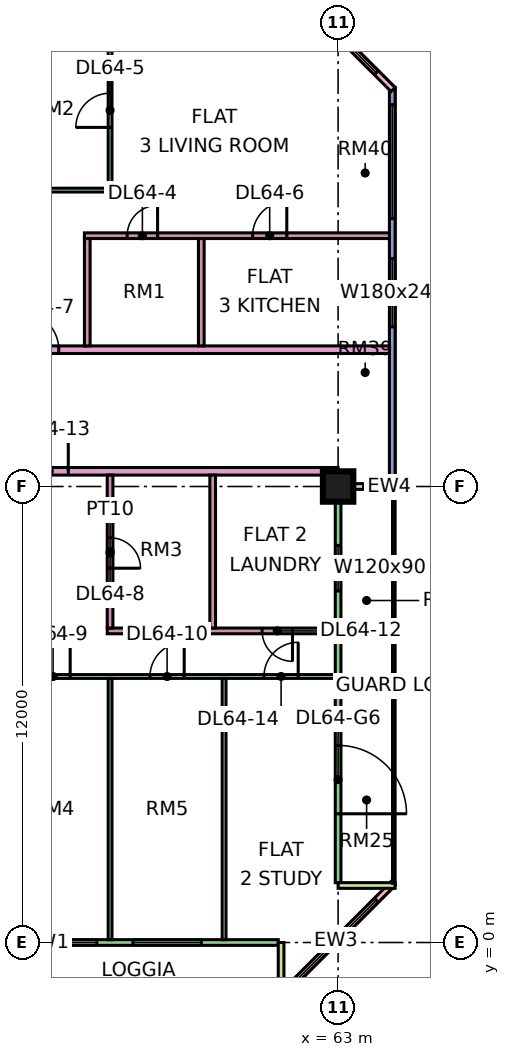
"""IFC4 building model, lengths in metres.
Left out: names, types, materials, properties, quantities, classifications, styles, units other than length and angle.
Written with IfcOpenShell. Run it as: python <this file> out.ifc"""

import sys

from ifc_helpers import new_model, si_unit, direction, frame, frame_2d, origin, origin_2d, place, context, subcontext, project, spatial, rectangle, extrude, element, fill, save


model = new_model("IFC4")
c1 = context("Model", 3, precision=1e-05, world=origin(), true_north=direction((0.0, 1.0)))
c2 = subcontext(c1, "Body", "Model", "MODEL_VIEW")
j1 = project(units=[si_unit("LENGTHUNIT", "METRE"), si_unit("PLANEANGLEUNIT", "RADIAN")], contexts=[c1])
p1 = place(None, origin())
s1 = spatial("IfcSite", under=j1, at=p1, CompositionType="ELEMENT")
p2 = place(p1, origin())
s2 = spatial("IfcBuilding", under=s1, at=p2, CompositionType="ELEMENT")
p3 = place(p2, frame((0.0, 0.0, 277.15)))
s3 = spatial("IfcBuildingStorey", under=s2, at=p3, CompositionType="ELEMENT", Elevation=277.15)
p4 = place(p3, frame((63.0, 12.0, 0.0), z_axis=(0.0, 0.0, 1.0), x_axis=(1.0, 0.0, 0.0)))
e1 = element("IfcColumn", 1, at=p4, inside=s3, PredefinedType="COLUMN", context=c2, shape_type="SweptSolid", body=[
    extrude(rectangle(XDim=0.8, YDim=0.8, at=origin_2d()), origin(), (0.0, 0.0, 1.0), 3.75),
])
p5 = place(p3, frame((48.075, 0.0, 0.0), z_axis=(0.0, 0.0, 1.0), x_axis=(1.0, 0.0, 0.0)))
e2 = element("IfcWall", 2, at=p5, inside=s3, PredefinedType="SOLIDWALL", context=c2, shape_type="SweptSolid", body=[
    extrude(rectangle(XDim=13.35, YDim=0.15, at=frame_2d((6.675, 0.0))), origin(), (0.0, 0.0, 1.0), 3.35),
])
p6 = place(p5, frame((1.812, 0.0, 0.0)))
e3 = element("IfcOpeningElement", 3, at=p6, cuts=e2, PredefinedType="OPENING", context=c2, shape_type="SweptSolid", body=[
    extrude(rectangle(XDim=1.8, YDim=2.4, at=frame_2d((0.9, 1.2))), frame((0.0, 0.085, 0.0), z_axis=(0.0, -1.0, 0.0), x_axis=(1.0, 0.0, 0.0)), (0.0, 0.0, 1.0), 0.17),
])
p7 = place(p5, frame((6.775, 0.0, 0.45)))
e4 = element("IfcOpeningElement", 4, at=p7, cuts=e2, PredefinedType="OPENING", context=c2, shape_type="SweptSolid", body=[
    extrude(rectangle(XDim=1.8, YDim=2.4, at=frame_2d((0.9, 1.2))), frame((0.0, 0.085, 0.0), z_axis=(0.0, -1.0, 0.0), x_axis=(1.0, 0.0, 0.0)), (0.0, 0.0, 1.0), 0.17),
])
p8 = place(p5, frame((9.525, 0.0, 0.45)))
e5 = element("IfcOpeningElement", 5, at=p8, cuts=e2, PredefinedType="OPENING", context=c2, shape_type="SweptSolid", body=[
    extrude(rectangle(XDim=1.8, YDim=2.4, at=frame_2d((0.9, 1.2))), frame((0.0, 0.085, 0.0), z_axis=(0.0, -1.0, 0.0), x_axis=(1.0, 0.0, 0.0)), (0.0, 0.0, 1.0), 0.17),
])
p9 = place(p3, frame((61.5, -1.5, 0.0), z_axis=(0.0, 0.0, 1.0), x_axis=(0.0, 1.0, 0.0)))
e6 = element("IfcWall", 6, at=p9, inside=s3, PredefinedType="SOLIDWALL", context=c2, shape_type="SweptSolid", body=[
    extrude(rectangle(XDim=1.5, YDim=0.15, at=frame_2d((0.75, 0.0))), origin(), (0.0, 0.0, 1.0), 3.35),
])
p10 = place(p3, frame((61.447, -1.447, 0.0), z_axis=(0.0, 0.0, 1.0), x_axis=(0.707106781187, 0.707106781187, 0.0)))
e7 = element("IfcWall", 7, at=p10, inside=s3, PredefinedType="SOLIDWALL", context=c2, shape_type="SweptSolid", body=[
    extrude(rectangle(XDim=4.243, YDim=0.15, at=frame_2d((2.121, 0.0))), origin(), (0.0, 0.0, 1.0), 3.35),
])
p11 = place(p10, frame((0.621, 0.0, 0.45)))
e8 = element("IfcOpeningElement", 8, at=p11, cuts=e7, PredefinedType="OPENING", context=c2, shape_type="SweptSolid", body=[
    extrude(rectangle(XDim=3.0, YDim=2.4, at=frame_2d((1.5, 1.2))), frame((0.0, 0.085, 0.0), z_axis=(0.0, -1.0, 0.0), x_axis=(1.0, 0.0, 0.0)), (0.0, 0.0, 1.0), 0.17),
])
p12 = place(p3, frame((63.0, 1.575, 0.0), z_axis=(0.0, 0.0, 1.0), x_axis=(0.0, 1.0, 0.0)))
e9 = element("IfcWall", 9, at=p12, inside=s3, PredefinedType="SOLIDWALL", context=c2, shape_type="SweptSolid", body=[
    extrude(rectangle(XDim=10.35, YDim=0.15, at=frame_2d((5.175, 0.0))), origin(), (0.0, 0.0, 1.0), 3.35),
])
p13 = place(p12, frame((1.812, 0.0, 0.0)))
e10 = element("IfcOpeningElement", 10, at=p13, cuts=e9, PredefinedType="OPENING", context=c2, shape_type="SweptSolid", body=[
    extrude(rectangle(XDim=1.8, YDim=2.4, at=frame_2d((0.9, 1.2))), frame((0.0, 0.085, 0.0), z_axis=(0.0, -1.0, 0.0), x_axis=(1.0, 0.0, 0.0)), (0.0, 0.0, 1.0), 0.17),
])
p14 = place(p12, frame((7.675, 0.0, 1.7)))
e11 = element("IfcOpeningElement", 11, at=p14, cuts=e9, PredefinedType="OPENING", context=c2, shape_type="SweptSolid", body=[
    extrude(rectangle(XDim=1.2, YDim=0.9, at=frame_2d((0.6, 0.45))), frame((0.0, 0.085, 0.0), z_axis=(0.0, -1.0, 0.0), x_axis=(1.0, 0.0, 0.0)), (0.0, 0.0, 1.0), 0.17),
])
for number, where, z_axis, x_axis in (
    (12, (64.5, 1.5, 0.0), (0.0, 0.0, 1.0), (-1.0, 0.0, 0.0)),
    (13, (64.5, 12.0, 0.0), (0.0, 0.0, 1.0), (-1.0, 0.0, 0.0)),
):
    element("IfcWall", number, at=place(p3, frame(where, z_axis=z_axis, x_axis=x_axis)), inside=s3, PredefinedType="SOLIDWALL", context=c2, shape_type="SweptSolid", body=[
        extrude(rectangle(XDim=1.5, YDim=0.15, at=frame_2d((0.75, 0.0))), origin(), (0.0, 0.0, 1.0), 3.35),
    ])
p15 = place(p3, frame((64.425, 12.075, 0.0), z_axis=(0.0, 0.0, 1.0), x_axis=(0.0, 1.0, 0.0)))
e14 = element("IfcWall", 14, at=p15, inside=s3, PredefinedType="SOLIDWALL", context=c2, shape_type="SweptSolid", body=[
    extrude(rectangle(XDim=10.425, YDim=0.15, at=frame_2d((5.212, 0.0))), origin(), (0.0, 0.0, 1.0), 3.35),
])
p16 = place(p15, frame((4.125, 0.0, 0.45)))
e15 = element("IfcOpeningElement", 15, at=p16, cuts=e14, PredefinedType="OPENING", context=c2, shape_type="SweptSolid", body=[
    extrude(rectangle(XDim=1.8, YDim=2.4, at=frame_2d((0.9, 1.2))), frame((0.0, 0.085, 0.0), z_axis=(0.0, -1.0, 0.0), x_axis=(1.0, 0.0, 0.0)), (0.0, 0.0, 1.0), 0.17),
])
p17 = place(p15, frame((6.975, 0.0, 0.45)))
e16 = element("IfcOpeningElement", 16, at=p17, cuts=e14, PredefinedType="OPENING", context=c2, shape_type="SweptSolid", body=[
    extrude(rectangle(XDim=3.0, YDim=2.4, at=frame_2d((1.5, 1.2))), frame((0.0, 0.085, 0.0), z_axis=(0.0, -1.0, 0.0), x_axis=(1.0, 0.0, 0.0)), (0.0, 0.0, 1.0), 0.17),
])
p18 = place(p3, frame((64.447, 22.447, 0.0), z_axis=(0.0, 0.0, 1.0), x_axis=(-0.707106781187, 0.707106781187, 0.0)))
e17 = element("IfcWall", 17, at=p18, inside=s3, PredefinedType="SOLIDWALL", context=c2, shape_type="SweptSolid", body=[
    extrude(rectangle(XDim=4.243, YDim=0.15, at=frame_2d((2.121, 0.0))), origin(), (0.0, 0.0, 1.0), 3.35),
])
p19 = place(p18, frame((0.621, 0.0, 0.45)))
e18 = element("IfcOpeningElement", 18, at=p19, cuts=e17, PredefinedType="OPENING", context=c2, shape_type="SweptSolid", body=[
    extrude(rectangle(XDim=3.0, YDim=2.4, at=frame_2d((1.5, 1.2))), frame((0.0, 0.085, 0.0), z_axis=(0.0, -1.0, 0.0), x_axis=(1.0, 0.0, 0.0)), (0.0, 0.0, 1.0), 0.17),
])
p20 = place(p3, frame((40.65, 12.4, 0.0), z_axis=(0.0, 0.0, 1.0), x_axis=(1.0, 0.0, 0.0)))
e19 = element("IfcWall", 19, at=p20, inside=s3, PredefinedType="PARTITIONING", context=c2, shape_type="SweptSolid", body=[
    extrude(rectangle(XDim=22.35, YDim=0.2, at=frame_2d((11.175, 0.0))), origin(), (0.0, 0.0, 1.0), 3.35),
])
p21 = place(p20, frame((14.25, 0.0, 0.0)))
e20 = element("IfcOpeningElement", 20, at=p21, cuts=e19, PredefinedType="OPENING", context=c2, shape_type="SweptSolid", body=[
    extrude(rectangle(XDim=1.0, YDim=2.1, at=frame_2d((0.5, 1.05))), frame((0.0, 0.11, 0.0), z_axis=(0.0, -1.0, 0.0), x_axis=(1.0, 0.0, 0.0)), (0.0, 0.0, 1.0), 0.22),
])
p22 = place(p20, frame((1.05, 0.0, 0.0)))
e21 = element("IfcOpeningElement", 21, at=p22, cuts=e19, PredefinedType="OPENING", context=c2, shape_type="SweptSolid", body=[
    extrude(rectangle(XDim=1.0, YDim=2.1, at=frame_2d((0.5, 1.05))), frame((0.0, 0.11, 0.0), z_axis=(0.0, -1.0, 0.0), x_axis=(1.0, 0.0, 0.0)), (0.0, 0.0, 1.0), 0.22),
])
p23 = place(p3, frame((51.225, 15.6, 0.0), z_axis=(0.0, 0.0, 1.0), x_axis=(1.0, 0.0, 0.0)))
e22 = element("IfcWall", 22, at=p23, inside=s3, PredefinedType="PARTITIONING", context=c2, shape_type="SweptSolid", body=[
    extrude(rectangle(XDim=13.125, YDim=0.2, at=frame_2d((6.562, 0.0))), origin(), (0.0, 0.0, 1.0), 3.35),
])
p24 = place(p23, frame((3.425, 0.0, 0.0)))
e23 = element("IfcOpeningElement", 23, at=p24, cuts=e22, PredefinedType="OPENING", context=c2, shape_type="SweptSolid", body=[
    extrude(rectangle(XDim=1.0, YDim=2.1, at=frame_2d((0.5, 1.05))), frame((0.0, 0.11, 0.0), z_axis=(0.0, -1.0, 0.0), x_axis=(1.0, 0.0, 0.0)), (0.0, 0.0, 1.0), 0.22),
])
p25 = place(p23, frame((0.875, 0.0, 0.0)))
e24 = element("IfcOpeningElement", 24, at=p25, cuts=e22, PredefinedType="OPENING", context=c2, shape_type="SweptSolid", body=[
    extrude(rectangle(XDim=1.0, YDim=2.1, at=frame_2d((0.5, 1.05))), frame((0.0, 0.11, 0.0), z_axis=(0.0, -1.0, 0.0), x_axis=(1.0, 0.0, 0.0)), (0.0, 0.0, 1.0), 0.22),
])
p26 = place(p3, frame((53.95, 7.0, 0.0), z_axis=(0.0, 0.0, 1.0), x_axis=(1.0, 0.0, 0.0)))
e25 = element("IfcWall", 25, at=p26, inside=s3, PredefinedType="PARTITIONING", context=c2, shape_type="SweptSolid", body=[
    extrude(rectangle(XDim=8.976, YDim=0.1, at=frame_2d((4.488, 0.0))), origin(), (0.0, 0.0, 1.0), 3.35),
])
p27 = place(p26, frame((1.1, 0.0, 0.0)))
e26 = element("IfcOpeningElement", 26, at=p27, cuts=e25, PredefinedType="OPENING", context=c2, shape_type="SweptSolid", body=[
    extrude(rectangle(XDim=0.9, YDim=2.1, at=frame_2d((0.45, 1.05))), frame((0.0, 0.06, 0.0), z_axis=(0.0, -1.0, 0.0), x_axis=(1.0, 0.0, 0.0)), (0.0, 0.0, 1.0), 0.12),
])
p28 = place(p26, frame((4.1, 0.0, 0.0)))
e27 = element("IfcOpeningElement", 27, at=p28, cuts=e25, PredefinedType="OPENING", context=c2, shape_type="SweptSolid", body=[
    extrude(rectangle(XDim=0.9, YDim=2.1, at=frame_2d((0.45, 1.05))), frame((0.0, 0.06, 0.0), z_axis=(0.0, -1.0, 0.0), x_axis=(1.0, 0.0, 0.0)), (0.0, 0.0, 1.0), 0.12),
])
p29 = place(p26, frame((7.1, 0.0, 0.0)))
e28 = element("IfcOpeningElement", 28, at=p29, cuts=e25, PredefinedType="OPENING", context=c2, shape_type="SweptSolid", body=[
    extrude(rectangle(XDim=0.9, YDim=2.1, at=frame_2d((0.45, 1.05))), frame((0.0, 0.06, 0.0), z_axis=(0.0, -1.0, 0.0), x_axis=(1.0, 0.0, 0.0)), (0.0, 0.0, 1.0), 0.12),
])
p30 = place(p3, frame((54.1, 19.8, 0.0), z_axis=(0.0, 0.0, 1.0), x_axis=(1.0, 0.0, 0.0)))
e29 = element("IfcWall", 29, at=p30, inside=s3, PredefinedType="PARTITIONING", context=c2, shape_type="SweptSolid", body=[
    extrude(rectangle(XDim=2.85, YDim=0.1, at=frame_2d((1.425, 0.0))), origin(), (0.0, 0.0, 1.0), 3.35),
])
p31 = place(p3, frame((56.325, 18.6, 0.0), z_axis=(0.0, 0.0, 1.0), x_axis=(1.0, 0.0, 0.0)))
e30 = element("IfcWall", 30, at=p31, inside=s3, PredefinedType="PARTITIONING", context=c2, shape_type="SweptSolid", body=[
    extrude(rectangle(XDim=8.025, YDim=0.15, at=frame_2d((4.013, 0.0))), origin(), (0.0, 0.0, 1.0), 3.35),
])
p32 = place(p31, frame((1.125, 0.0, 0.0)))
e31 = element("IfcOpeningElement", 31, at=p32, cuts=e30, PredefinedType="OPENING", context=c2, shape_type="SweptSolid", body=[
    extrude(rectangle(XDim=0.8, YDim=2.1, at=frame_2d((0.4, 1.05))), frame((0.0, 0.085, 0.0), z_axis=(0.0, -1.0, 0.0), x_axis=(1.0, 0.0, 0.0)), (0.0, 0.0, 1.0), 0.17),
])
p33 = place(p31, frame((4.425, 0.0, 0.0)))
e32 = element("IfcOpeningElement", 32, at=p33, cuts=e30, PredefinedType="OPENING", context=c2, shape_type="SweptSolid", body=[
    extrude(rectangle(XDim=0.9, YDim=2.1, at=frame_2d((0.45, 1.05))), frame((0.0, 0.085, 0.0), z_axis=(0.0, -1.0, 0.0), x_axis=(1.0, 0.0, 0.0)), (0.0, 0.0, 1.0), 0.17),
])
p34 = place(p3, frame((56.4, 15.7, 0.0), z_axis=(0.0, 0.0, 1.0), x_axis=(0.0, 1.0, 0.0)))
e33 = element("IfcWall", 33, at=p34, inside=s3, PredefinedType="PARTITIONING", context=c2, shape_type="SweptSolid", body=[
    extrude(rectangle(XDim=2.825, YDim=0.15, at=frame_2d((1.413, 0.0))), origin(), (0.0, 0.0, 1.0), 3.35),
])
p35 = place(p3, frame((56.925, 8.2, 0.0), z_axis=(0.0, 0.0, 1.0), x_axis=(1.0, 0.0, 0.0)))
e34 = element("IfcWall", 34, at=p35, inside=s3, PredefinedType="PARTITIONING", context=c2, shape_type="SweptSolid", body=[
    extrude(rectangle(XDim=6.001, YDim=0.15, at=frame_2d((3.0, 0.0))), origin(), (0.0, 0.0, 1.0), 3.35),
])
p36 = place(p35, frame((4.075, 0.0, 0.0)))
e35 = element("IfcOpeningElement", 35, at=p36, cuts=e34, PredefinedType="OPENING", context=c2, shape_type="SweptSolid", body=[
    extrude(rectangle(XDim=0.8, YDim=2.1, at=frame_2d((0.4, 1.05))), frame((0.0, 0.085, 0.0), z_axis=(0.0, -1.0, 0.0), x_axis=(1.0, 0.0, 0.0)), (0.0, 0.0, 1.0), 0.17),
])
p37 = place(p3, frame((57.0, 0.074, 0.0), z_axis=(0.0, 0.0, 1.0), x_axis=(0.0, 1.0, 0.0)))
e36 = element("IfcWall", 36, at=p37, inside=s3, PredefinedType="PARTITIONING", context=c2, shape_type="SweptSolid", body=[
    extrude(rectangle(XDim=6.876, YDim=0.1, at=frame_2d((3.438, 0.0))), origin(), (0.0, 0.0, 1.0), 3.35),
])
p38 = place(p3, frame((57.0, 8.275, 0.0), z_axis=(0.0, 0.0, 1.0), x_axis=(0.0, 1.0, 0.0)))
e37 = element("IfcWall", 37, at=p38, inside=s3, PredefinedType="PARTITIONING", context=c2, shape_type="SweptSolid", body=[
    extrude(rectangle(XDim=4.025, YDim=0.15, at=frame_2d((2.013, 0.0))), origin(), (0.0, 0.0, 1.0), 3.35),
])
p39 = place(p38, frame((1.575, 0.0, 0.0)))
e38 = element("IfcOpeningElement", 38, at=p39, cuts=e37, PredefinedType="OPENING", context=c2, shape_type="SweptSolid", body=[
    extrude(rectangle(XDim=0.8, YDim=2.1, at=frame_2d((0.4, 1.05))), frame((0.0, 0.085, 0.0), z_axis=(0.0, -1.0, 0.0), x_axis=(1.0, 0.0, 0.0)), (0.0, 0.0, 1.0), 0.17),
])
p40 = place(p3, frame((57.0, 19.75, 0.0), z_axis=(0.0, 0.0, 1.0), x_axis=(0.0, 1.0, 0.0)))
e39 = element("IfcWall", 39, at=p40, inside=s3, PredefinedType="PARTITIONING", context=c2, shape_type="SweptSolid", body=[
    extrude(rectangle(XDim=4.176, YDim=0.1, at=frame_2d((2.088, 0.0))), origin(), (0.0, 0.0, 1.0), 3.35),
])
p41 = place(p40, frame((1.7, 0.0, 0.0)))
e40 = element("IfcOpeningElement", 40, at=p41, cuts=e39, PredefinedType="OPENING", context=c2, shape_type="SweptSolid", body=[
    extrude(rectangle(XDim=0.9, YDim=2.1, at=frame_2d((0.45, 1.05))), frame((0.0, 0.06, 0.0), z_axis=(0.0, -1.0, 0.0), x_axis=(1.0, 0.0, 0.0)), (0.0, 0.0, 1.0), 0.12),
])
p42 = place(p3, frame((59.4, 15.7, 0.0), z_axis=(0.0, 0.0, 1.0), x_axis=(0.0, 1.0, 0.0)))
e41 = element("IfcWall", 41, at=p42, inside=s3, PredefinedType="PARTITIONING", context=c2, shape_type="SweptSolid", body=[
    extrude(rectangle(XDim=2.825, YDim=0.15, at=frame_2d((1.413, 0.0))), origin(), (0.0, 0.0, 1.0), 3.35),
])
p43 = place(p3, frame((59.7, 8.275, 0.0), z_axis=(0.0, 0.0, 1.0), x_axis=(0.0, 1.0, 0.0)))
e42 = element("IfcWall", 42, at=p43, inside=s3, PredefinedType="PARTITIONING", context=c2, shape_type="SweptSolid", body=[
    extrude(rectangle(XDim=4.025, YDim=0.15, at=frame_2d((2.013, 0.0))), origin(), (0.0, 0.0, 1.0), 3.35),
])
p44 = place(p3, frame((60.0, 0.074, 0.0), z_axis=(0.0, 0.0, 1.0), x_axis=(0.0, 1.0, 0.0)))
e43 = element("IfcWall", 43, at=p44, inside=s3, PredefinedType="PARTITIONING", context=c2, shape_type="SweptSolid", body=[
    extrude(rectangle(XDim=6.876, YDim=0.1, at=frame_2d((3.438, 0.0))), origin(), (0.0, 0.0, 1.0), 3.35),
])
p45 = place(p7, origin())
e44 = element("IfcWindow", 44, at=p45, inside=s3, PartitioningType="SINGLE_PANEL", PredefinedType="WINDOW", context=c2, shape_type="SweptSolid", body=[
    extrude(rectangle(XDim=1.8, YDim=2.4, at=frame_2d((0.9, 1.2))), frame((0.0, 0.03, 0.0), z_axis=(0.0, -1.0, 0.0), x_axis=(1.0, 0.0, 0.0)), (0.0, 0.0, 1.0), 0.06),
])
fill(e4, e44)
p46 = place(p8, origin())
e45 = element("IfcWindow", 45, at=p46, inside=s3, PartitioningType="SINGLE_PANEL", PredefinedType="WINDOW", context=c2, shape_type="SweptSolid", body=[
    extrude(rectangle(XDim=1.8, YDim=2.4, at=frame_2d((0.9, 1.2))), frame((0.0, 0.03, 0.0), z_axis=(0.0, -1.0, 0.0), x_axis=(1.0, 0.0, 0.0)), (0.0, 0.0, 1.0), 0.06),
])
fill(e5, e45)
p47 = place(p11, origin())
e46 = element("IfcWindow", 46, at=p47, inside=s3, PartitioningType="SINGLE_PANEL", PredefinedType="WINDOW", context=c2, shape_type="SweptSolid", body=[
    extrude(rectangle(XDim=3.0, YDim=2.4, at=frame_2d((1.5, 1.2))), frame((0.0, 0.03, 0.0), z_axis=(0.0, -1.0, 0.0), x_axis=(1.0, 0.0, 0.0)), (0.0, 0.0, 1.0), 0.06),
])
fill(e8, e46)
p48 = place(p13, frame((1.8, 0.0, 0.0), z_axis=(0.0, 0.0, 1.0), x_axis=(-1.0, 0.0, 0.0)))
e47 = element("IfcDoor", 47, at=p48, inside=s3, OperationType="DOUBLE_DOOR_SINGLE_SWING", PredefinedType="DOOR", context=c2, shape_type="SweptSolid", body=[
    extrude(rectangle(XDim=1.8, YDim=2.4, at=frame_2d((0.9, 1.2))), frame((0.0, 0.025, 0.0), z_axis=(0.0, -1.0, 0.0), x_axis=(1.0, 0.0, 0.0)), (0.0, 0.0, 1.0), 0.05),
])
fill(e10, e47)
p49 = place(p14, origin())
e48 = element("IfcWindow", 48, at=p49, inside=s3, PartitioningType="SINGLE_PANEL", PredefinedType="WINDOW", context=c2, shape_type="SweptSolid", body=[
    extrude(rectangle(XDim=1.2, YDim=0.9, at=frame_2d((0.6, 0.45))), frame((0.0, 0.03, 0.0), z_axis=(0.0, -1.0, 0.0), x_axis=(1.0, 0.0, 0.0)), (0.0, 0.0, 1.0), 0.06),
])
fill(e11, e48)
p50 = place(p16, origin())
e49 = element("IfcWindow", 49, at=p50, inside=s3, PartitioningType="SINGLE_PANEL", PredefinedType="WINDOW", context=c2, shape_type="SweptSolid", body=[
    extrude(rectangle(XDim=1.8, YDim=2.4, at=frame_2d((0.9, 1.2))), frame((0.0, 0.03, 0.0), z_axis=(0.0, -1.0, 0.0), x_axis=(1.0, 0.0, 0.0)), (0.0, 0.0, 1.0), 0.06),
])
fill(e15, e49)
p51 = place(p17, origin())
e50 = element("IfcWindow", 50, at=p51, inside=s3, PartitioningType="SINGLE_PANEL", PredefinedType="WINDOW", context=c2, shape_type="SweptSolid", body=[
    extrude(rectangle(XDim=3.0, YDim=2.4, at=frame_2d((1.5, 1.2))), frame((0.0, 0.03, 0.0), z_axis=(0.0, -1.0, 0.0), x_axis=(1.0, 0.0, 0.0)), (0.0, 0.0, 1.0), 0.06),
])
fill(e16, e50)
p52 = place(p19, origin())
e51 = element("IfcWindow", 51, at=p52, inside=s3, PartitioningType="SINGLE_PANEL", PredefinedType="WINDOW", context=c2, shape_type="SweptSolid", body=[
    extrude(rectangle(XDim=3.0, YDim=2.4, at=frame_2d((1.5, 1.2))), frame((0.0, 0.03, 0.0), z_axis=(0.0, -1.0, 0.0), x_axis=(1.0, 0.0, 0.0)), (0.0, 0.0, 1.0), 0.06),
])
fill(e18, e51)
p53 = place(p32, frame((0.8, 0.0, 0.0), z_axis=(0.0, 0.0, 1.0), x_axis=(-1.0, 0.0, 0.0)))
e52 = element("IfcDoor", 52, at=p53, inside=s3, OperationType="SINGLE_SWING_RIGHT", PredefinedType="DOOR", context=c2, shape_type="SweptSolid", body=[
    extrude(rectangle(XDim=0.8, YDim=2.1, at=frame_2d((0.4, 1.05))), frame((0.0, 0.025, 0.0), z_axis=(0.0, -1.0, 0.0), x_axis=(1.0, 0.0, 0.0)), (0.0, 0.0, 1.0), 0.05),
])
fill(e31, e52)
p54 = place(p41, origin())
e53 = element("IfcDoor", 53, at=p54, inside=s3, OperationType="SINGLE_SWING_LEFT", PredefinedType="DOOR", context=c2, shape_type="SweptSolid", body=[
    extrude(rectangle(XDim=0.9, YDim=2.1, at=frame_2d((0.45, 1.05))), frame((0.0, 0.025, 0.0), z_axis=(0.0, -1.0, 0.0), x_axis=(1.0, 0.0, 0.0)), (0.0, 0.0, 1.0), 0.05),
])
fill(e40, e53)
p55 = place(p33, frame((0.9, 0.0, 0.0), z_axis=(0.0, 0.0, 1.0), x_axis=(-1.0, 0.0, 0.0)))
e54 = element("IfcDoor", 54, at=p55, inside=s3, OperationType="SINGLE_SWING_RIGHT", PredefinedType="DOOR", context=c2, shape_type="SweptSolid", body=[
    extrude(rectangle(XDim=0.9, YDim=2.1, at=frame_2d((0.45, 1.05))), frame((0.0, 0.025, 0.0), z_axis=(0.0, -1.0, 0.0), x_axis=(1.0, 0.0, 0.0)), (0.0, 0.0, 1.0), 0.05),
])
fill(e32, e54)
p56 = place(p24, origin())
e55 = element("IfcDoor", 55, at=p56, inside=s3, OperationType="SINGLE_SWING_LEFT", PredefinedType="DOOR", context=c2, shape_type="SweptSolid", body=[
    extrude(rectangle(XDim=1.0, YDim=2.1, at=frame_2d((0.5, 1.05))), frame((0.0, 0.025, 0.0), z_axis=(0.0, -1.0, 0.0), x_axis=(1.0, 0.0, 0.0)), (0.0, 0.0, 1.0), 0.05),
])
fill(e23, e55)
p57 = place(p39, frame((0.8, 0.0, 0.0), z_axis=(0.0, 0.0, 1.0), x_axis=(-1.0, 0.0, 0.0)))
e56 = element("IfcDoor", 56, at=p57, inside=s3, OperationType="SINGLE_SWING_LEFT", PredefinedType="DOOR", context=c2, shape_type="SweptSolid", body=[
    extrude(rectangle(XDim=0.8, YDim=2.1, at=frame_2d((0.4, 1.05))), frame((0.0, 0.025, 0.0), z_axis=(0.0, -1.0, 0.0), x_axis=(1.0, 0.0, 0.0)), (0.0, 0.0, 1.0), 0.05),
])
fill(e38, e56)
p58 = place(p27, frame((0.9, 0.0, 0.0), z_axis=(0.0, 0.0, 1.0), x_axis=(-1.0, 0.0, 0.0)))
e57 = element("IfcDoor", 57, at=p58, inside=s3, OperationType="SINGLE_SWING_RIGHT", PredefinedType="DOOR", context=c2, shape_type="SweptSolid", body=[
    extrude(rectangle(XDim=0.9, YDim=2.1, at=frame_2d((0.45, 1.05))), frame((0.0, 0.025, 0.0), z_axis=(0.0, -1.0, 0.0), x_axis=(1.0, 0.0, 0.0)), (0.0, 0.0, 1.0), 0.05),
])
fill(e26, e57)
p59 = place(p28, frame((0.9, 0.0, 0.0), z_axis=(0.0, 0.0, 1.0), x_axis=(-1.0, 0.0, 0.0)))
e58 = element("IfcDoor", 58, at=p59, inside=s3, OperationType="SINGLE_SWING_RIGHT", PredefinedType="DOOR", context=c2, shape_type="SweptSolid", body=[
    extrude(rectangle(XDim=0.9, YDim=2.1, at=frame_2d((0.45, 1.05))), frame((0.0, 0.025, 0.0), z_axis=(0.0, -1.0, 0.0), x_axis=(1.0, 0.0, 0.0)), (0.0, 0.0, 1.0), 0.05),
])
fill(e27, e58)
p60 = place(p36, origin())
e59 = element("IfcDoor", 59, at=p60, inside=s3, OperationType="SINGLE_SWING_RIGHT", PredefinedType="DOOR", context=c2, shape_type="SweptSolid", body=[
    extrude(rectangle(XDim=0.8, YDim=2.1, at=frame_2d((0.4, 1.05))), frame((0.0, 0.025, 0.0), z_axis=(0.0, -1.0, 0.0), x_axis=(1.0, 0.0, 0.0)), (0.0, 0.0, 1.0), 0.05),
])
fill(e35, e59)
p61 = place(p21, frame((1.0, 0.0, 0.0), z_axis=(0.0, 0.0, 1.0), x_axis=(-1.0, 0.0, 0.0)))
e60 = element("IfcDoor", 60, at=p61, inside=s3, OperationType="SINGLE_SWING_RIGHT", PredefinedType="DOOR", context=c2, shape_type="SweptSolid", body=[
    extrude(rectangle(XDim=1.0, YDim=2.1, at=frame_2d((0.5, 1.05))), frame((0.0, 0.025, 0.0), z_axis=(0.0, -1.0, 0.0), x_axis=(1.0, 0.0, 0.0)), (0.0, 0.0, 1.0), 0.05),
])
fill(e20, e60)
p62 = place(p29, frame((0.9, 0.0, 0.0), z_axis=(0.0, 0.0, 1.0), x_axis=(-1.0, 0.0, 0.0)))
e61 = element("IfcDoor", 61, at=p62, inside=s3, OperationType="SINGLE_SWING_RIGHT", PredefinedType="DOOR", context=c2, shape_type="SweptSolid", body=[
    extrude(rectangle(XDim=0.9, YDim=2.1, at=frame_2d((0.45, 1.05))), frame((0.0, 0.025, 0.0), z_axis=(0.0, -1.0, 0.0), x_axis=(1.0, 0.0, 0.0)), (0.0, 0.0, 1.0), 0.05),
])
fill(e28, e61)
save(model, sys.argv[1])
